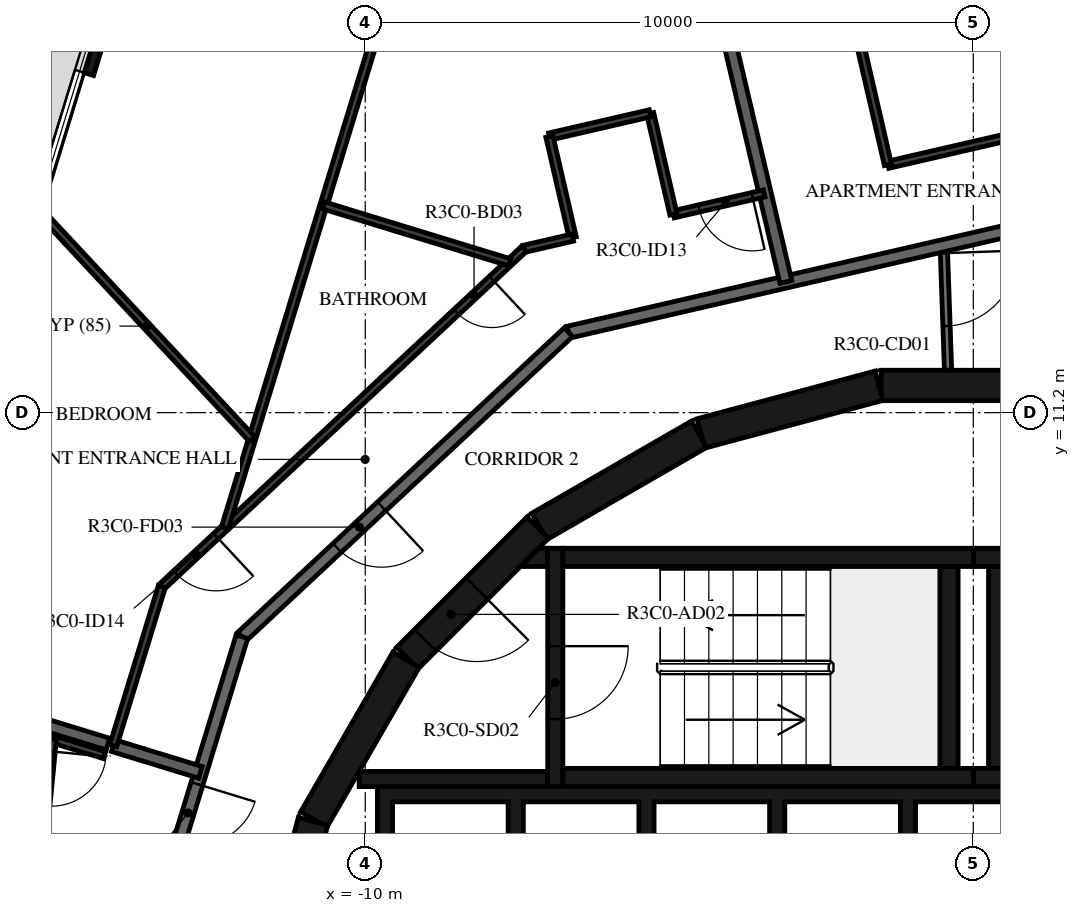
"""IFC4 building model, lengths in metres.
Left out: names, types, materials, properties, quantities, classifications, styles, units other than length and angle.
Written with IfcOpenShell. Run it as: python <this file> out.ifc"""

import sys

from ifc_helpers import new_model, si_unit, direction, frame, frame_2d, origin, place, context, subcontext, project, spatial, polyline, rectangle, outline, extrude, element, fill, save


model = new_model("IFC4")
c1 = context("Model", 3, precision=1e-05, world=origin(), true_north=direction((0.0, 1.0)))
c2 = subcontext(c1, "Body", "Model", "MODEL_VIEW")
j1 = project(units=[si_unit("LENGTHUNIT", "METRE"), si_unit("PLANEANGLEUNIT", "RADIAN")], contexts=[c1])
p1 = place(None, origin())
s1 = spatial("IfcSite", under=j1, at=p1, CompositionType="ELEMENT")
p2 = place(p1, origin())
s2 = spatial("IfcBuilding", under=s1, at=p2, CompositionType="ELEMENT")
p3 = place(p2, frame((0.0, 0.0, 141.4)))
s3 = spatial("IfcBuildingStorey", under=s2, at=p3, CompositionType="ELEMENT", Elevation=141.4)
p4 = place(p3, frame((-13.609, 19.827, 0.0), z_axis=(0.0, 0.0, 1.0), x_axis=(-0.292348395078, -0.956311882126, 0.0)))
e1 = element("IfcWall", 1, at=p4, inside=s3, PredefinedType="STANDARD", context=c2, shape_type="SweptSolid", body=[
    extrude(rectangle(XDim=3.2, YDim=0.16, at=frame_2d((1.6, 0.0))), origin(), (0.0, 0.0, 1.0), 3.05),
])
p5 = place(p4, frame((0.4, 0.0, 0.0)))
e2 = element("IfcOpeningElement", 2, at=p5, cuts=e1, PredefinedType="OPENING", context=c2, shape_type="SweptSolid", body=[
    extrude(rectangle(XDim=2.4, YDim=2.4, at=frame_2d((1.2, 1.2))), frame((0.0, 0.09, 0.0), z_axis=(0.0, -1.0, 0.0), x_axis=(1.0, 0.0, 0.0)), (0.0, 0.0, 1.0), 0.18),
])
for number, where, z_axis, x_axis in (
    (3, (1.516, 11.647, 0.0), (0.0, 0.0, 1.0), (-1.0, 0.0, 0.0)),
    (4, (-1.55, 11.643, 0.0), (0.0, 0.0, 1.0), (-0.966, -0.259, 0.0)),
    (5, (-4.51, 10.845, 0.0), (0.0, 0.0, 1.0), (-0.866, -0.5, 0.0)),
):
    element("IfcWall", number, at=place(p3, frame(where, z_axis=z_axis, x_axis=x_axis)), inside=s3, PredefinedType="SHEAR", context=c2, shape_type="SweptSolid", body=[
        extrude(rectangle(XDim=3.033, YDim=0.5, at=frame_2d((1.516, 0.0))), origin(), (0.0, 0.0, 1.0), 3.05),
    ])
p6 = place(p3, frame((-7.164, 9.308, 0.0), z_axis=(0.0, 0.0, 1.0), x_axis=(-0.707106781187, -0.707106781187, 0.0)))
e6 = element("IfcWall", 6, at=p6, inside=s3, PredefinedType="SHEAR", context=c2, shape_type="SweptSolid", body=[
    extrude(rectangle(XDim=3.032, YDim=0.5, at=frame_2d((1.516, 0.0))), origin(), (0.0, 0.0, 1.0), 3.05),
])
p7 = place(p6, frame((1.416, 0.0, 0.0)))
e7 = element("IfcOpeningElement", 7, at=p7, cuts=e6, PredefinedType="OPENING", context=c2, shape_type="SweptSolid", body=[
    extrude(rectangle(XDim=1.2, YDim=2.1, at=frame_2d((0.6, 1.05))), frame((0.0, 0.26, 0.0), z_axis=(0.0, -1.0, 0.0), x_axis=(1.0, 0.0, 0.0)), (0.0, 0.0, 1.0), 0.52),
])
for number, where, z_axis, x_axis in (
    (8, (-9.329, 7.137, 0.0), (0.0, 0.0, 1.0), (-0.5, -0.866, 0.0)),
    (9, (-10.858, 4.479, 0.0), (0.0, 0.0, 1.0), (-0.259, -0.966, 0.0)),
):
    element("IfcWall", number, at=place(p3, frame(where, z_axis=z_axis, x_axis=x_axis)), inside=s3, PredefinedType="SHEAR", context=c2, shape_type="SweptSolid", body=[
        extrude(rectangle(XDim=3.033, YDim=0.5, at=frame_2d((1.516, 0.0))), origin(), (0.0, 0.0, 1.0), 3.05),
    ])
for number, where, z_axis, x_axis in (
    (10, (0.0, 5.2, 0.0), (0.0, 0.0, 1.0), (1.0, 0.0, 0.0)),
    (11, (0.0, 8.82, 0.0), (0.0, 0.0, 1.0), (1.0, 0.0, 0.0)),
):
    element("IfcWall", number, at=place(p3, frame(where, z_axis=z_axis, x_axis=x_axis)), inside=s3, PredefinedType="SHEAR", context=c2, shape_type="SweptSolid", body=[
        extrude(rectangle(XDim=6.75, YDim=0.3, at=frame_2d((3.375, 0.0))), origin(), (0.0, 0.0, 1.0), 3.05),
    ])
p8 = place(p3, frame((0.4, 5.35, 0.0), z_axis=(0.0, 0.0, 1.0), x_axis=(0.0, 1.0, 0.0)))
e12 = element("IfcWall", 12, at=p8, inside=s3, PredefinedType="SHEAR", context=c2, shape_type="SweptSolid", body=[
    extrude(rectangle(XDim=3.32, YDim=0.3, at=frame_2d((1.66, 0.0))), origin(), (0.0, 0.0, 1.0), 3.05),
])
for number, where, z_axis, x_axis in (
    (13, (-6.75, 5.2, 0.0), (0.0, 0.0, 1.0), (1.0, 0.0, 0.0)),
    (14, (-6.75, 8.82, 0.0), (0.0, 0.0, 1.0), (1.0, 0.0, 0.0)),
):
    element("IfcWall", number, at=place(p3, frame(where, z_axis=z_axis, x_axis=x_axis)), inside=s3, PredefinedType="SHEAR", context=c2, shape_type="SweptSolid", body=[
        extrude(rectangle(XDim=6.75, YDim=0.3, at=frame_2d((3.375, 0.0))), origin(), (0.0, 0.0, 1.0), 3.05),
    ])
p9 = place(p3, frame((-0.4, 5.35, 0.0), z_axis=(0.0, 0.0, 1.0), x_axis=(0.0, 1.0, 0.0)))
e15 = element("IfcWall", 15, at=p9, inside=s3, PredefinedType="SHEAR", context=c2, shape_type="SweptSolid", body=[
    extrude(rectangle(XDim=3.32, YDim=0.3, at=frame_2d((1.66, 0.0))), origin(), (0.0, 0.0, 1.0), 3.05),
])
p10 = place(p3, frame((-6.875, 8.97, 0.0), z_axis=(0.0, 0.0, 1.0), x_axis=(0.0, -1.0, 0.0)))
e16 = element("IfcWall", 16, at=p10, inside=s3, PredefinedType="SHEAR", context=c2, shape_type="SweptSolid", body=[
    extrude(rectangle(XDim=3.92, YDim=0.25, at=frame_2d((1.96, 0.0))), origin(), (0.0, 0.0, 1.0), 3.05),
])
p11 = place(p10, frame((1.61, 0.0, 0.0)))
e17 = element("IfcOpeningElement", 17, at=p11, cuts=e16, PredefinedType="OPENING", context=c2, shape_type="SweptSolid", body=[
    extrude(rectangle(XDim=1.2, YDim=2.1, at=frame_2d((0.6, 1.05))), frame((0.0, 0.135, 0.0), z_axis=(0.0, -1.0, 0.0), x_axis=(1.0, 0.0, 0.0)), (0.0, 0.0, 1.0), 0.27),
])
p12 = place(p3, frame((-7.0, 5.175, 0.0), z_axis=(0.0, 0.0, 1.0), x_axis=(-1.0, 0.0, 0.0)))
e18 = element("IfcWall", 18, at=p12, inside=s3, PredefinedType="SHEAR", context=c2, shape_type="SweptSolid", body=[
    extrude(rectangle(XDim=3.1, YDim=0.25, at=frame_2d((1.55, 0.0))), origin(), (0.0, 0.0, 1.0), 3.05),
])
p13 = place(p3, origin())
e19 = element("IfcWall", 19, at=p13, inside=s3, PredefinedType="SHEAR", context=c2, shape_type="SweptSolid", body=[
    extrude(outline(polyline([(-7.148, 8.97), (-7.0, 8.97), (-7.0, 8.67), (-7.448, 8.67), (-7.148, 8.97)])), origin(), (0.0, 0.0, 1.0), 3.05),
])
p14 = place(p3, origin())
e20 = element("IfcWall", 20, at=p14, inside=s3, PredefinedType="SHEAR", context=c2, shape_type="SweptSolid", body=[
    extrude(outline(polyline([(-9.55, 4.8), (-7.65, 4.8), (-7.65, 1.9), (-7.4, 1.9), (-7.4, 4.8), (-5.5, 4.8), (-5.5, 1.9), (-5.25, 1.9), (-5.25, 4.8), (-3.35, 4.8), (-3.35, 1.9), (-3.1, 1.9), (-3.1, 4.8), (-1.2, 4.8), (-1.2, 1.9), (-0.95, 1.9), (-0.95, 4.8), (0.95, 4.8), (0.95, 1.9), (1.2, 1.9), (1.2, 4.8), (3.1, 4.8), (3.1, 1.9), (3.35, 1.9), (3.35, 4.8), (5.25, 4.8), (5.25, 1.9), (5.5, 1.9), (5.5, 4.8), (7.4, 4.8), (7.4, 1.9), (7.65, 1.9), (7.65, 4.8), (9.55, 4.8), (9.55, 1.9), (9.8, 1.9), (9.8, 4.8), (9.8, 5.05), (-9.8, 5.05), (-9.8, 4.8), (-9.8, 1.9), (-9.55, 1.9), (-9.55, 4.8)])), origin(), (0.0, 0.0, 1.0), 3.05),
])
p15 = place(p3, frame((-0.487, 13.948, 0.0), z_axis=(0.0, 0.0, 1.0), x_axis=(0.034859752231, -0.999392214135, 0.0)))
e21 = element("IfcWall", 21, at=p15, inside=s3, PredefinedType="PARTITIONING", context=c2, shape_type="SweptSolid", body=[
    extrude(rectangle(XDim=2.052, YDim=0.12, at=frame_2d((1.026, 0.0))), origin(), (0.0, 0.0, 1.0), 3.05),
])
p16 = place(p15, frame((0.125, 0.0, 0.0)))
e22 = element("IfcOpeningElement", 22, at=p16, cuts=e21, PredefinedType="OPENING", context=c2, shape_type="SweptSolid", body=[
    extrude(rectangle(XDim=1.2, YDim=2.1, at=frame_2d((0.6, 1.05))), frame((0.0, 0.07, 0.0), z_axis=(0.0, -1.0, 0.0), x_axis=(1.0, 0.0, 0.0)), (0.0, 0.0, 1.0), 0.14),
])
p17 = place(p3, frame((0.495, 14.175, 0.0), z_axis=(0.0, 0.0, 1.0), x_axis=(-0.974376622151, -0.224922649383, 0.0)))
e23 = element("IfcWall", 23, at=p17, inside=s3, PredefinedType="STANDARD", context=c2, shape_type="SweptSolid", body=[
    extrude(rectangle(XDim=7.342, YDim=0.2, at=frame_2d((3.671, 0.0))), origin(), (0.0, 0.0, 1.0), 3.05),
])
p18 = place(p3, frame((-6.659, 12.523, 0.0), z_axis=(0.0, 0.0, 1.0), x_axis=(-0.731350455479, -0.682001841105, 0.0)))
e24 = element("IfcWall", 24, at=p18, inside=s3, PredefinedType="STANDARD", context=c2, shape_type="SweptSolid", body=[
    extrude(rectangle(XDim=7.342, YDim=0.2, at=frame_2d((3.671, 0.0))), origin(), (0.0, 0.0, 1.0), 3.05),
])
p19 = place(p18, frame((4.2, 0.0, 0.0)))
e25 = element("IfcOpeningElement", 25, at=p19, cuts=e24, PredefinedType="OPENING", context=c2, shape_type="SweptSolid", body=[
    extrude(rectangle(XDim=1.0, YDim=2.1, at=frame_2d((0.5, 1.05))), frame((0.0, 0.11, 0.0), z_axis=(0.0, -1.0, 0.0), x_axis=(1.0, 0.0, 0.0)), (0.0, 0.0, 1.0), 0.22),
])
p20 = place(p3, frame((-12.028, 7.516, 0.0), z_axis=(0.0, 0.0, 1.0), x_axis=(-0.292365533182, -0.956306642771, 0.0)))
e26 = element("IfcWall", 26, at=p20, inside=s3, PredefinedType="STANDARD", context=c2, shape_type="SweptSolid", body=[
    extrude(rectangle(XDim=7.342, YDim=0.2, at=frame_2d((3.671, 0.0))), origin(), (0.0, 0.0, 1.0), 3.05),
])
p21 = place(p20, frame((2.533, 0.0, 0.0)))
e27 = element("IfcOpeningElement", 27, at=p21, cuts=e26, PredefinedType="OPENING", context=c2, shape_type="SweptSolid", body=[
    extrude(rectangle(XDim=1.0, YDim=2.1, at=frame_2d((0.5, 1.05))), frame((0.0, 0.11, 0.0), z_axis=(0.0, -1.0, 0.0), x_axis=(1.0, 0.0, 0.0)), (0.0, 0.0, 1.0), 0.22),
])
p22 = place(p3, frame((-4.281, 18.448, 0.0), z_axis=(0.0, 0.0, 1.0), x_axis=(0.228867856942, -0.973457499873, 0.0)))
e28 = element("IfcWall", 28, at=p22, inside=s3, PredefinedType="STANDARD", context=c2, shape_type="SweptSolid", body=[
    extrude(rectangle(XDim=5.238, YDim=0.2, at=frame_2d((2.619, 0.0))), origin(), (0.0, 0.0, 1.0), 3.05),
])
p23 = place(p3, frame((-14.145, 5.724, 0.0), z_axis=(0.0, 0.0, 1.0), x_axis=(0.956266872747, -0.292495586439, 0.0)))
e29 = element("IfcWall", 29, at=p23, inside=s3, PredefinedType="STANDARD", context=c2, shape_type="SweptSolid", body=[
    extrude(rectangle(XDim=1.5, YDim=0.2, at=frame_2d((0.75, 0.0))), origin(), (0.0, 0.0, 1.0), 3.05),
])
p24 = place(p3, frame((-17.674, 6.803, 0.0), z_axis=(0.0, 0.0, 1.0), x_axis=(0.956293645939, -0.292408041504, 0.0)))
e30 = element("IfcWall", 30, at=p24, inside=s3, PredefinedType="STANDARD", context=c2, shape_type="SweptSolid", body=[
    extrude(rectangle(XDim=3.6, YDim=0.2, at=frame_2d((1.8, 0.0))), origin(), (0.0, 0.0, 1.0), 3.05),
])
p25 = place(p3, frame((0.549, 15.727, 0.0), z_axis=(0.0, 0.0, 1.0), x_axis=(-0.97436861061, -0.224957352975, 0.0)))
e31 = element("IfcWall", 31, at=p25, inside=s3, PredefinedType="PARTITIONING", context=c2, shape_type="SweptSolid", body=[
    extrude(rectangle(XDim=2.004, YDim=0.12, at=frame_2d((1.002, 0.0))), origin(), (0.0, 0.0, 1.0), 3.05),
])
p26 = place(p3, frame((-1.404, 15.276, 0.0), z_axis=(0.0, 0.0, 1.0), x_axis=(-0.224947305813, 0.974370930194, 0.0)))
e32 = element("IfcWall", 32, at=p26, inside=s3, PredefinedType="PARTITIONING", context=c2, shape_type="SweptSolid", body=[
    extrude(rectangle(XDim=5.28, YDim=0.12, at=frame_2d((2.64, 0.0))), origin(), (0.0, 0.0, 1.0), 3.05),
])
p27 = place(p3, frame((-1.539, 24.071, 0.0), z_axis=(0.0, 0.0, 1.0), x_axis=(0.68200220595, -0.731350115252, 0.0)))
e33 = element("IfcWall", 33, at=p27, inside=s3, PredefinedType="PARTITIONING", context=c2, shape_type="SweptSolid", body=[
    extrude(rectangle(XDim=17.316, YDim=0.12, at=frame_2d((8.658, 0.0))), origin(), (0.0, 0.0, 1.0), 3.05),
])
p28 = place(p27, frame((3.323, 0.0, 0.0)))
e34 = element("IfcOpeningElement", 34, at=p28, cuts=e33, PredefinedType="OPENING", context=c2, shape_type="SweptSolid", body=[
    extrude(rectangle(XDim=0.9, YDim=2.1, at=frame_2d((0.45, 1.05))), frame((0.0, 0.07, 0.0), z_axis=(0.0, -1.0, 0.0), x_axis=(1.0, 0.0, 0.0)), (0.0, 0.0, 1.0), 0.14),
])
p29 = place(p27, frame((0.2, 0.0, 0.0)))
e35 = element("IfcOpeningElement", 35, at=p29, cuts=e33, PredefinedType="OPENING", context=c2, shape_type="SweptSolid", body=[
    extrude(rectangle(XDim=0.9, YDim=2.1, at=frame_2d((0.45, 1.05))), frame((0.0, 0.07, 0.0), z_axis=(0.0, -1.0, 0.0), x_axis=(1.0, 0.0, 0.0)), (0.0, 0.0, 1.0), 0.14),
])
p30 = place(p3, frame((-3.44, 14.806, 0.0), z_axis=(0.0, 0.0, 1.0), x_axis=(-0.974356244071, -0.225010910046, 0.0)))
e36 = element("IfcWall", 36, at=p30, inside=s3, PredefinedType="PARTITIONING", context=c2, shape_type="SweptSolid", body=[
    extrude(rectangle(XDim=1.531, YDim=0.12, at=frame_2d((0.766, 0.0))), origin(), (0.0, 0.0, 1.0), 3.05),
])
p31 = place(p30, frame((0.2, 0.0, 0.0)))
e37 = element("IfcOpeningElement", 37, at=p31, cuts=e36, PredefinedType="OPENING", context=c2, shape_type="SweptSolid", body=[
    extrude(rectangle(XDim=0.9, YDim=2.1, at=frame_2d((0.45, 1.05))), frame((0.0, 0.07, 0.0), z_axis=(0.0, -1.0, 0.0), x_axis=(1.0, 0.0, 0.0)), (0.0, 0.0, 1.0), 0.14),
])
p32 = place(p3, frame((-4.931, 14.461, 0.0), z_axis=(0.0, 0.0, 1.0), x_axis=(-0.224911785629, 0.974379129849, 0.0)))
e38 = element("IfcWall", 38, at=p32, inside=s3, PredefinedType="PARTITIONING", context=c2, shape_type="SweptSolid", body=[
    extrude(rectangle(XDim=1.705, YDim=0.12, at=frame_2d((0.853, 0.0))), origin(), (0.0, 0.0, 1.0), 3.05),
])
p33 = place(p3, frame((-5.315, 16.123, 0.0), z_axis=(0.0, 0.0, 1.0), x_axis=(-0.974352456598, -0.225027310168, 0.0)))
e39 = element("IfcWall", 39, at=p33, inside=s3, PredefinedType="PARTITIONING", context=c2, shape_type="SweptSolid", body=[
    extrude(rectangle(XDim=1.7, YDim=0.12, at=frame_2d((0.85, 0.0))), origin(), (0.0, 0.0, 1.0), 3.05),
])
p34 = place(p3, frame((-6.971, 15.74, 0.0), z_axis=(0.0, 0.0, 1.0), x_axis=(0.224943164347, -0.974371886301, 0.0)))
e40 = element("IfcWall", 40, at=p34, inside=s3, PredefinedType="PARTITIONING", context=c2, shape_type="SweptSolid", body=[
    extrude(rectangle(XDim=1.705, YDim=0.12, at=frame_2d((0.853, 0.0))), origin(), (0.0, 0.0, 1.0), 3.05),
])
p35 = place(p3, frame((-6.588, 14.079, 0.0), z_axis=(0.0, 0.0, 1.0), x_axis=(-0.974391195695, -0.224859506699, 0.0)))
e41 = element("IfcWall", 41, at=p35, inside=s3, PredefinedType="PARTITIONING", context=c2, shape_type="SweptSolid", body=[
    extrude(rectangle(XDim=0.821, YDim=0.12, at=frame_2d((0.41, 0.0))), origin(), (0.0, 0.0, 1.0), 3.05),
])
p36 = place(p3, frame((-7.388, 13.894, 0.0), z_axis=(0.0, 0.0, 1.0), x_axis=(-0.731357186721, -0.681994622729, 0.0)))
e42 = element("IfcWall", 42, at=p36, inside=s3, PredefinedType="PARTITIONING", context=c2, shape_type="SweptSolid", body=[
    extrude(rectangle(XDim=8.146, YDim=0.12, at=frame_2d((4.073, 0.0))), origin(), (0.0, 0.0, 1.0), 3.05),
])
p37 = place(p36, frame((0.725, 0.0, 0.0)))
e43 = element("IfcOpeningElement", 43, at=p37, cuts=e42, PredefinedType="OPENING", context=c2, shape_type="SweptSolid", body=[
    extrude(rectangle(XDim=0.8, YDim=2.1, at=frame_2d((0.4, 1.05))), frame((0.0, 0.07, 0.0), z_axis=(0.0, -1.0, 0.0), x_axis=(1.0, 0.0, 0.0)), (0.0, 0.0, 1.0), 0.14),
])
p38 = place(p36, frame((6.927, 0.0, 0.0)))
e44 = element("IfcOpeningElement", 44, at=p38, cuts=e42, PredefinedType="OPENING", context=c2, shape_type="SweptSolid", body=[
    extrude(rectangle(XDim=0.9, YDim=2.1, at=frame_2d((0.45, 1.05))), frame((0.0, 0.07, 0.0), z_axis=(0.0, -1.0, 0.0), x_axis=(1.0, 0.0, 0.0)), (0.0, 0.0, 1.0), 0.14),
])
p39 = place(p3, frame((-13.345, 8.339, 0.0), z_axis=(0.0, 0.0, 1.0), x_axis=(-0.292316072367, -0.956321762712, 0.0)))
e45 = element("IfcWall", 45, at=p39, inside=s3, PredefinedType="PARTITIONING", context=c2, shape_type="SweptSolid", body=[
    extrude(rectangle(XDim=2.734, YDim=0.12, at=frame_2d((1.367, 0.0))), origin(), (0.0, 0.0, 1.0), 3.05),
])
p40 = place(p3, frame((-8.417, 22.031, 0.0), z_axis=(0.0, 0.0, 1.0), x_axis=(-0.292371891841, -0.956304698755, 0.0)))
e46 = element("IfcWall", 46, at=p40, inside=s3, PredefinedType="PARTITIONING", context=c2, shape_type="SweptSolid", body=[
    extrude(rectangle(XDim=13.306, YDim=0.12, at=frame_2d((6.653, 0.0))), origin(), (0.0, 0.0, 1.0), 3.05),
])
p41 = place(p40, frame((2.777, 0.0, 0.0)))
e47 = element("IfcOpeningElement", 47, at=p41, cuts=e46, PredefinedType="OPENING", context=c2, shape_type="SweptSolid", body=[
    extrude(rectangle(XDim=0.9, YDim=2.1, at=frame_2d((0.45, 1.05))), frame((0.0, 0.07, 0.0), z_axis=(0.0, -1.0, 0.0), x_axis=(1.0, 0.0, 0.0)), (0.0, 0.0, 1.0), 0.14),
])
p42 = place(p3, frame((-10.687, 14.608, 0.0), z_axis=(0.0, 0.0, 1.0), x_axis=(0.956295309419, -0.292402601189, 0.0)))
e48 = element("IfcWall", 48, at=p42, inside=s3, PredefinedType="PARTITIONING", context=c2, shape_type="SweptSolid", body=[
    extrude(rectangle(XDim=3.201, YDim=0.12, at=frame_2d((1.601, 0.0))), origin(), (0.0, 0.0, 1.0), 3.05),
])
p43 = place(p3, frame((-15.327, 14.481, 0.0), z_axis=(0.0, 0.0, 1.0), x_axis=(0.68197575128, -0.731374783997, 0.0)))
e49 = element("IfcWall", 49, at=p43, inside=s3, PredefinedType="PARTITIONING", context=c2, shape_type="SweptSolid", body=[
    extrude(rectangle(XDim=5.081, YDim=0.12, at=frame_2d((2.54, 0.0))), origin(), (0.0, 0.0, 1.0), 3.05),
])
p44 = place(p3, frame((-14.287, 5.568, 0.0), z_axis=(0.0, 0.0, 1.0), x_axis=(-0.956287662261, 0.292427609859, 0.0)))
e50 = element("IfcWall", 50, at=p44, inside=s3, PredefinedType="PARTITIONING", context=c2, shape_type="SweptSolid", body=[
    extrude(rectangle(XDim=0.89, YDim=0.12, at=frame_2d((0.445, 0.0))), origin(), (0.0, 0.0, 1.0), 3.05),
])
p45 = place(p3, frame((-15.138, 5.828, 0.0), z_axis=(0.0, 0.0, 1.0), x_axis=(-0.096967255409, -0.995287572201, 0.0)))
e51 = element("IfcWall", 51, at=p45, inside=s3, PredefinedType="PARTITIONING", context=c2, shape_type="SweptSolid", body=[
    extrude(rectangle(XDim=4.489, YDim=0.12, at=frame_2d((2.245, 0.0))), origin(), (0.0, 0.0, 1.0), 3.05),
])
p46 = place(p45, frame((0.2, 0.0, 0.0)))
e52 = element("IfcOpeningElement", 52, at=p46, cuts=e51, PredefinedType="OPENING", context=c2, shape_type="SweptSolid", body=[
    extrude(rectangle(XDim=0.9, YDim=2.1, at=frame_2d((0.45, 1.05))), frame((0.0, 0.07, 0.0), z_axis=(0.0, -1.0, 0.0), x_axis=(1.0, 0.0, 0.0)), (0.0, 0.0, 1.0), 0.14),
])
p47 = place(p11, origin())
e53 = element("IfcDoor", 53, at=p47, inside=s3, OperationType="SINGLE_SWING_LEFT", PredefinedType="DOOR", context=c2, shape_type="SweptSolid", body=[
    extrude(rectangle(XDim=1.2, YDim=2.1, at=frame_2d((0.6, 1.05))), frame((0.0, 0.025, 0.0), z_axis=(0.0, -1.0, 0.0), x_axis=(1.0, 0.0, 0.0)), (0.0, 0.0, 1.0), 0.05),
])
fill(e17, e53)
p48 = place(p7, origin())
e54 = element("IfcDoor", 54, at=p48, inside=s3, OperationType="SINGLE_SWING_RIGHT", PredefinedType="DOOR", context=c2, shape_type="SweptSolid", body=[
    extrude(rectangle(XDim=1.2, YDim=2.1, at=frame_2d((0.6, 1.05))), frame((0.0, 0.025, 0.0), z_axis=(0.0, -1.0, 0.0), x_axis=(1.0, 0.0, 0.0)), (0.0, 0.0, 1.0), 0.05),
])
fill(e7, e54)
p49 = place(p19, origin())
e55 = element("IfcDoor", 55, at=p49, inside=s3, OperationType="SINGLE_SWING_LEFT", PredefinedType="DOOR", context=c2, shape_type="SweptSolid", body=[
    extrude(rectangle(XDim=1.0, YDim=2.1, at=frame_2d((0.5, 1.05))), frame((0.0, 0.025, 0.0), z_axis=(0.0, -1.0, 0.0), x_axis=(1.0, 0.0, 0.0)), (0.0, 0.0, 1.0), 0.05),
])
fill(e25, e55)
p50 = place(p31, origin())
e56 = element("IfcDoor", 56, at=p50, inside=s3, OperationType="SINGLE_SWING_LEFT", PredefinedType="DOOR", context=c2, shape_type="SweptSolid", body=[
    extrude(rectangle(XDim=0.9, YDim=2.1, at=frame_2d((0.45, 1.05))), frame((0.0, 0.025, 0.0), z_axis=(0.0, -1.0, 0.0), x_axis=(1.0, 0.0, 0.0)), (0.0, 0.0, 1.0), 0.05),
])
fill(e37, e56)
p51 = place(p37, origin())
e57 = element("IfcDoor", 57, at=p51, inside=s3, OperationType="SINGLE_SWING_LEFT", PredefinedType="DOOR", context=c2, shape_type="SweptSolid", body=[
    extrude(rectangle(XDim=0.8, YDim=2.1, at=frame_2d((0.4, 1.05))), frame((0.0, 0.025, 0.0), z_axis=(0.0, -1.0, 0.0), x_axis=(1.0, 0.0, 0.0)), (0.0, 0.0, 1.0), 0.05),
])
fill(e43, e57)
p52 = place(p38, origin())
e58 = element("IfcDoor", 58, at=p52, inside=s3, OperationType="SINGLE_SWING_LEFT", PredefinedType="DOOR", context=c2, shape_type="SweptSolid", body=[
    extrude(rectangle(XDim=0.9, YDim=2.1, at=frame_2d((0.45, 1.05))), frame((0.0, 0.025, 0.0), z_axis=(0.0, -1.0, 0.0), x_axis=(1.0, 0.0, 0.0)), (0.0, 0.0, 1.0), 0.05),
])
fill(e44, e58)
p53 = place(p21, origin())
e59 = element("IfcDoor", 59, at=p53, inside=s3, OperationType="SINGLE_SWING_LEFT", PredefinedType="DOOR", context=c2, shape_type="SweptSolid", body=[
    extrude(rectangle(XDim=1.0, YDim=2.1, at=frame_2d((0.5, 1.05))), frame((0.0, 0.025, 0.0), z_axis=(0.0, -1.0, 0.0), x_axis=(1.0, 0.0, 0.0)), (0.0, 0.0, 1.0), 0.05),
])
fill(e27, e59)
p54 = place(p46, origin())
e60 = element("IfcDoor", 60, at=p54, inside=s3, OperationType="SINGLE_SWING_LEFT", PredefinedType="DOOR", context=c2, shape_type="SweptSolid", body=[
    extrude(rectangle(XDim=0.9, YDim=2.1, at=frame_2d((0.45, 1.05))), frame((0.0, 0.025, 0.0), z_axis=(0.0, -1.0, 0.0), x_axis=(1.0, 0.0, 0.0)), (0.0, 0.0, 1.0), 0.05),
])
fill(e52, e60)
p55 = place(p16, origin())
e61 = element("IfcDoor", 61, at=p55, inside=s3, OperationType="DOUBLE_DOOR_SINGLE_SWING", PredefinedType="DOOR", context=c2, shape_type="SweptSolid", body=[
    extrude(rectangle(XDim=1.2, YDim=2.1, at=frame_2d((0.6, 1.05))), frame((0.0, 0.025, 0.0), z_axis=(0.0, -1.0, 0.0), x_axis=(1.0, 0.0, 0.0)), (0.0, 0.0, 1.0), 0.05),
])
fill(e22, e61)
save(model, sys.argv[1])
